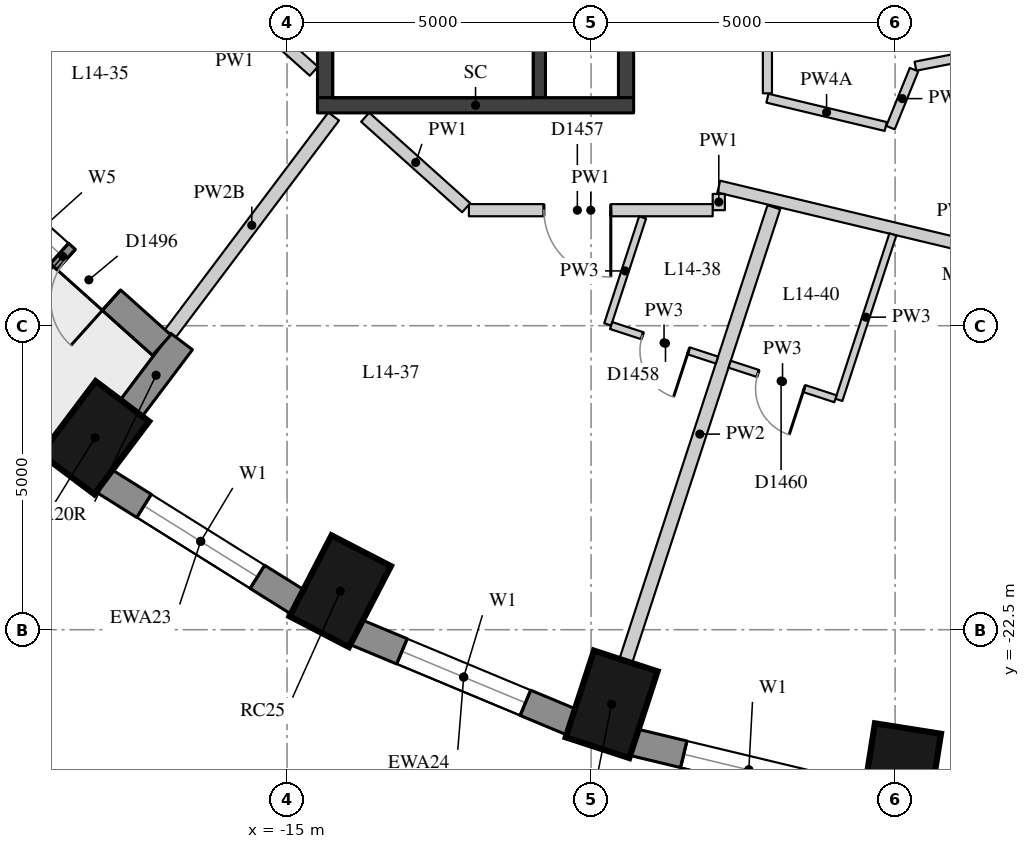
"""IFC4 building model, lengths in metres.
Left out: names, types, materials, properties, quantities, classifications, styles, units other than length and angle.
Written with IfcOpenShell. Run it as: python <this file> out.ifc"""

import sys

from ifc_helpers import new_model, si_unit, direction, frame, frame_2d, origin, origin_2d, place, context, subcontext, project, spatial, rectangle, extrude, element, fill, save


model = new_model("IFC4")
c1 = context("Model", 3, precision=1e-05, world=origin(), true_north=direction((0.0, 1.0)))
c2 = subcontext(c1, "Body", "Model", "MODEL_VIEW")
j1 = project(units=[si_unit("LENGTHUNIT", "METRE"), si_unit("PLANEANGLEUNIT", "RADIAN")], contexts=[c1])
p1 = place(None, origin())
s1 = spatial("IfcSite", under=j1, at=p1, CompositionType="ELEMENT")
p2 = place(p1, origin())
s2 = spatial("IfcBuilding", under=s1, at=p2, CompositionType="ELEMENT")
p3 = place(p2, frame((0.0, 0.0, 54.7)))
s3 = spatial("IfcBuildingStorey", under=s2, at=p3, CompositionType="ELEMENT", Elevation=54.7)
for number, where, z_axis, x_axis in (
    (1, (-18.159, -19.343, 0.0), (0.0, 0.0, 1.0), (-0.601, -0.799, 0.0)),
    (2, (-14.125, -21.867, 0.0), (0.0, 0.0, 1.0), (-0.46, -0.888, 0.0)),
    (3, (-9.662, -23.727, 0.0), (0.0, 0.0, 1.0), (-0.31, -0.951, 0.0)),
    (4, (-4.906, -24.866, 0.0), (0.0, 0.0, 1.0), (-0.156, -0.988, 0.0)),
):
    element("IfcColumn", number, at=place(p3, frame(where, z_axis=z_axis, x_axis=x_axis)), inside=s3, PredefinedType="COLUMN", context=c2, shape_type="SweptSolid", body=[
        extrude(rectangle(XDim=1.5, YDim=1.1, at=origin_2d()), origin(), (0.0, 0.0, 1.0), 3.3),
    ])
p4 = place(p3, frame((-18.023, -20.044, 0.0), z_axis=(0.0, 0.0, 1.0), x_axis=(0.847635480093, -0.530579016629, 0.0)))
e5 = element("IfcWall", 5, at=p4, inside=s3, PredefinedType="SOLIDWALL", context=c2, shape_type="SweptSolid", body=[
    extrude(rectangle(XDim=3.782, YDim=0.45, at=frame_2d((1.891, 0.0))), origin(), (0.0, 0.0, 1.0), 3.02),
])
p5 = place(p4, frame((0.791, 0.0, 0.4)))
e6 = element("IfcOpeningElement", 6, at=p5, cuts=e5, PredefinedType="OPENING", context=c2, shape_type="SweptSolid", body=[
    extrude(rectangle(XDim=2.2, YDim=1.75, at=frame_2d((1.1, 0.875))), frame((0.0, 0.235, 0.0), z_axis=(0.0, -1.0, 0.0), x_axis=(1.0, 0.0, 0.0)), (0.0, 0.0, 1.0), 0.47),
])
p6 = place(p3, frame((-13.875, -22.537, 0.0), z_axis=(0.0, 0.0, 1.0), x_axis=(0.923031964282, -0.384723267966, 0.0)))
e7 = element("IfcWall", 7, at=p6, inside=s3, PredefinedType="SOLIDWALL", context=c2, shape_type="SweptSolid", body=[
    extrude(rectangle(XDim=3.856, YDim=0.45, at=frame_2d((1.928, 0.0))), origin(), (0.0, 0.0, 1.0), 3.02),
])
p7 = place(p6, frame((0.828, 0.0, 0.4)))
e8 = element("IfcOpeningElement", 8, at=p7, cuts=e7, PredefinedType="OPENING", context=c2, shape_type="SweptSolid", body=[
    extrude(rectangle(XDim=2.2, YDim=1.75, at=frame_2d((1.1, 0.875))), frame((0.0, 0.235, 0.0), z_axis=(0.0, -1.0, 0.0), x_axis=(1.0, 0.0, 0.0)), (0.0, 0.0, 1.0), 0.47),
])
p8 = place(p3, frame((-9.308, -24.35, 0.0), z_axis=(0.0, 0.0, 1.0), x_axis=(0.972496561493, -0.232917233979, 0.0)))
e9 = element("IfcWall", 9, at=p8, inside=s3, PredefinedType="SOLIDWALL", context=c2, shape_type="SweptSolid", body=[
    extrude(rectangle(XDim=3.911, YDim=0.45, at=frame_2d((1.956, 0.0))), origin(), (0.0, 0.0, 1.0), 3.02),
])
p9 = place(p8, frame((0.855, 0.0, 0.4)))
e10 = element("IfcOpeningElement", 10, at=p9, cuts=e9, PredefinedType="OPENING", context=c2, shape_type="SweptSolid", body=[
    extrude(rectangle(XDim=2.2, YDim=1.75, at=frame_2d((1.1, 0.875))), frame((0.0, 0.235, 0.0), z_axis=(0.0, -1.0, 0.0), x_axis=(1.0, 0.0, 0.0)), (0.0, 0.0, 1.0), 0.47),
])
p10 = place(p3, frame((-17.572, -18.871, 0.0), z_axis=(0.0, 0.0, 1.0), x_axis=(0.601262851241, 0.799051302306, 0.0)))
e11 = element("IfcWall", 11, at=p10, inside=s3, PredefinedType="SOLIDWALL", context=c2, shape_type="SweptSolid", body=[
    extrude(rectangle(XDim=1.391, YDim=0.45, at=frame_2d((0.696, 0.0))), origin(), (0.0, 0.0, 1.0), 2.57),
])
p11 = place(p3, frame((-20.313, -14.905, 0.0), z_axis=(0.0, 0.0, 1.0), x_axis=(0.744616407434, -0.667492626012, 0.0)))
e12 = element("IfcWall", 12, at=p11, inside=s3, PredefinedType="SOLIDWALL", context=c2, shape_type="SweptSolid", body=[
    extrude(rectangle(XDim=4.365, YDim=0.45, at=frame_2d((2.183, 0.0))), origin(), (0.0, 0.0, 1.0), 3.02),
])
p12 = place(p11, frame((1.108, 0.0, 0.4)))
e13 = element("IfcOpeningElement", 13, at=p12, cuts=e12, PredefinedType="OPENING", context=c2, shape_type="SweptSolid", body=[
    extrude(rectangle(XDim=1.0, YDim=1.75, at=frame_2d((0.5, 0.875))), frame((0.0, 0.235, 0.0), z_axis=(0.0, -1.0, 0.0), x_axis=(1.0, 0.0, 0.0)), (0.0, 0.0, 1.0), 0.47),
])
p13 = place(p11, frame((2.258, 0.0, 0.0)))
e14 = element("IfcOpeningElement", 14, at=p13, cuts=e12, PredefinedType="OPENING", context=c2, shape_type="SweptSolid", body=[
    extrude(rectangle(XDim=1.0, YDim=2.15, at=frame_2d((0.5, 1.075))), frame((0.0, 0.235, 0.0), z_axis=(0.0, -1.0, 0.0), x_axis=(1.0, 0.0, 0.0)), (0.0, 0.0, 1.0), 0.47),
])
p14 = place(p3, frame((-10.85, -13.75, 0.0), z_axis=(0.0, 0.0, 1.0), x_axis=(0.0, 1.0, 0.0)))
e15 = element("IfcWall", 15, at=p14, inside=s3, PredefinedType="SHEAR", context=c2, shape_type="SweptSolid", body=[
    extrude(rectangle(XDim=6.0, YDim=0.2, at=frame_2d((3.0, 0.0))), origin(), (0.0, 0.0, 1.0), 3.02),
])
p15 = place(p14, frame((4.4, 0.0, 0.0)))
e16 = element("IfcOpeningElement", 16, at=p15, cuts=e15, PredefinedType="OPENING", context=c2, shape_type="SweptSolid", body=[
    extrude(rectangle(XDim=1.5, YDim=2.1, at=frame_2d((0.75, 1.05))), frame((0.0, 0.11, 0.0), z_axis=(0.0, -1.0, 0.0), x_axis=(1.0, 0.0, 0.0)), (0.0, 0.0, 1.0), 0.22),
])
p16 = place(p3, frame((-14.375, -13.75, -0.28), z_axis=(0.0, 0.0, 1.0), x_axis=(0.0, 1.0, 0.0)))
e17 = element("IfcWall", 17, at=p16, inside=s3, PredefinedType="SHEAR", context=c2, shape_type="SweptSolid", body=[
    extrude(rectangle(XDim=6.0, YDim=0.25, at=frame_2d((3.0, 0.0))), origin(), (0.0, 0.0, 1.0), 3.3),
])
p17 = place(p3, frame((-9.425, -13.75, -0.28), z_axis=(0.0, 0.0, 1.0), x_axis=(0.0, 1.0, 0.0)))
e18 = element("IfcWall", 18, at=p17, inside=s3, PredefinedType="SHEAR", context=c2, shape_type="SweptSolid", body=[
    extrude(rectangle(XDim=6.0, YDim=0.25, at=frame_2d((3.0, 0.0))), origin(), (0.0, 0.0, 1.0), 3.3),
])
p18 = place(p17, frame((2.4, 0.0, 0.28)))
e19 = element("IfcOpeningElement", 19, at=p18, cuts=e18, PredefinedType="OPENING", context=c2, shape_type="SweptSolid", body=[
    extrude(rectangle(XDim=1.5, YDim=2.1, at=frame_2d((0.75, 1.05))), frame((0.0, 0.135, 0.0), z_axis=(0.0, -1.0, 0.0), x_axis=(1.0, 0.0, 0.0)), (0.0, 0.0, 1.0), 0.27),
])
p19 = place(p3, frame((-14.5, -13.875, -0.28), z_axis=(0.0, 0.0, 1.0), x_axis=(1.0, 0.0, 0.0)))
e20 = element("IfcWall", 20, at=p19, inside=s3, PredefinedType="SHEAR", context=c2, shape_type="SweptSolid", body=[
    extrude(rectangle(XDim=5.2, YDim=0.25, at=frame_2d((2.6, 0.0))), origin(), (0.0, 0.0, 1.0), 3.3),
])
p20 = place(p3, frame((-14.559, -13.314, 0.0), z_axis=(0.0, 0.0, 1.0), x_axis=(-0.744636171002, 0.667470578254, 0.0)))
e21 = element("IfcWall", 21, at=p20, inside=s3, PredefinedType="PARTITIONING", context=c2, shape_type="SweptSolid", body=[
    extrude(rectangle(XDim=2.069, YDim=0.2, at=frame_2d((1.035, 0.0))), origin(), (0.0, 0.0, 1.0), 3.02),
])
p21 = place(p3, frame((-0.098, -17.077, 0.0), z_axis=(0.0, 0.0, 1.0), x_axis=(-0.972607318404, 0.232454305588, 0.0)))
e22 = element("IfcWall", 22, at=p21, inside=s3, PredefinedType="PARTITIONING", context=c2, shape_type="SweptSolid", body=[
    extrude(rectangle(XDim=8.022, YDim=0.2, at=frame_2d((4.011, 0.0))), origin(), (0.0, 0.0, 1.0), 3.02),
])
p22 = place(p21, frame((1.479, 0.0, 0.0)))
e23 = element("IfcOpeningElement", 23, at=p22, cuts=e22, PredefinedType="OPENING", context=c2, shape_type="SweptSolid", body=[
    extrude(rectangle(XDim=1.1, YDim=2.1, at=frame_2d((0.55, 1.05))), frame((0.0, 0.11, 0.0), z_axis=(0.0, -1.0, 0.0), x_axis=(1.0, 0.0, 0.0)), (0.0, 0.0, 1.0), 0.22),
])
p23 = place(p3, frame((-7.9, -15.332, 0.0), z_axis=(0.0, 0.0, 1.0), x_axis=(0.0, -1.0, 0.0)))
e24 = element("IfcWall", 24, at=p23, inside=s3, PredefinedType="PARTITIONING", context=c2, shape_type="SweptSolid", body=[
    extrude(rectangle(XDim=0.268, YDim=0.2, at=frame_2d((0.134, 0.0))), origin(), (0.0, 0.0, 1.0), 3.02),
])
p24 = place(p3, frame((-8.0, -15.6, 0.0), z_axis=(0.0, 0.0, 1.0), x_axis=(-1.0, 0.0, 0.0)))
e25 = element("IfcWall", 25, at=p24, inside=s3, PredefinedType="PARTITIONING", context=c2, shape_type="SweptSolid", body=[
    extrude(rectangle(XDim=4.009, YDim=0.2, at=frame_2d((2.005, 0.0))), origin(), (0.0, 0.0, 1.0), 3.02),
])
p25 = place(p24, frame((1.676, 0.0, 0.0)))
e26 = element("IfcOpeningElement", 26, at=p25, cuts=e25, PredefinedType="OPENING", context=c2, shape_type="SweptSolid", body=[
    extrude(rectangle(XDim=1.1, YDim=2.1, at=frame_2d((0.55, 1.05))), frame((0.0, 0.11, 0.0), z_axis=(0.0, -1.0, 0.0), x_axis=(1.0, 0.0, 0.0)), (0.0, 0.0, 1.0), 0.22),
])
p26 = place(p3, frame((-12.054, -15.56, 0.0), z_axis=(0.0, 0.0, 1.0), x_axis=(-0.744625700487, 0.66748225907, 0.0)))
e27 = element("IfcWall", 27, at=p26, inside=s3, PredefinedType="PARTITIONING", context=c2, shape_type="SweptSolid", body=[
    extrude(rectangle(XDim=2.231, YDim=0.2, at=frame_2d((1.116, 0.0))), origin(), (0.0, 0.0, 1.0), 3.02),
])
p27 = place(p3, frame((-2.615, -12.83, 0.0), z_axis=(0.0, 0.0, 1.0), x_axis=(-0.981297312652, -0.192498270593, 0.0)))
e28 = element("IfcWall", 28, at=p27, inside=s3, PredefinedType="PARTITIONING", context=c2, shape_type="SweptSolid", body=[
    extrude(rectangle(XDim=2.09, YDim=0.15, at=frame_2d((1.045, 0.0))), origin(), (0.0, 0.0, 1.0), 3.02),
])
p28 = place(p3, frame((-4.688, -13.288, 0.0), z_axis=(0.0, 0.0, 1.0), x_axis=(-0.375963709287, -0.926634388148, 0.0)))
e29 = element("IfcWall", 29, at=p28, inside=s3, PredefinedType="PARTITIONING", context=c2, shape_type="SweptSolid", body=[
    extrude(rectangle(XDim=1.03, YDim=0.15, at=frame_2d((0.515, 0.0))), origin(), (0.0, 0.0, 1.0), 3.02),
])
p29 = place(p3, frame((-5.154, -14.224, 0.0), z_axis=(0.0, 0.0, 1.0), x_axis=(-0.97258848944, 0.232533073366, 0.0)))
e30 = element("IfcWall", 30, at=p29, inside=s3, PredefinedType="PARTITIONING", context=c2, shape_type="SweptSolid", body=[
    extrude(rectangle(XDim=2.001, YDim=0.15, at=frame_2d((1.0, 0.0))), origin(), (0.0, 0.0, 1.0), 2.57),
])
p30 = place(p3, frame((-7.1, -13.678, 0.0), z_axis=(0.0, 0.0, 1.0), x_axis=(0.0, 1.0, 0.0)))
e31 = element("IfcWall", 31, at=p30, inside=s3, PredefinedType="PARTITIONING", context=c2, shape_type="SweptSolid", body=[
    extrude(rectangle(XDim=1.928, YDim=0.15, at=frame_2d((0.964, 0.0))), origin(), (0.0, 0.0, 1.0), 3.02),
])
p31 = place(p3, frame((-16.927, -17.638, 0.0), z_axis=(0.0, 0.0, 1.0), x_axis=(0.601158965663, 0.799129462605, 0.0)))
e32 = element("IfcWall", 32, at=p31, inside=s3, PredefinedType="PARTITIONING", context=c2, shape_type="SweptSolid", body=[
    extrude(rectangle(XDim=4.48, YDim=0.22, at=frame_2d((2.24, 0.0))), origin(), (0.0, 0.0, 1.0), 2.57),
])
p32 = place(p3, frame((-9.429, -23.014, 0.0), z_axis=(0.0, 0.0, 1.0), x_axis=(0.310249775859, 0.950655077607, 0.0)))
e33 = element("IfcWall", 33, at=p32, inside=s3, PredefinedType="PARTITIONING", context=c2, shape_type="SweptSolid", body=[
    extrude(rectangle(XDim=7.85, YDim=0.22, at=frame_2d((3.925, 0.0))), origin(), (0.0, 0.0, 1.0), 3.02),
])
p33 = place(p3, frame((-9.153, -15.719, 0.0), z_axis=(0.0, 0.0, 1.0), x_axis=(-0.310326382186, -0.950630073435, 0.0)))
e34 = element("IfcWall", 34, at=p33, inside=s3, PredefinedType="PARTITIONING", context=c2, shape_type="SweptSolid", body=[
    extrude(rectangle(XDim=1.851, YDim=0.12, at=frame_2d((0.926, 0.0))), origin(), (0.0, 0.0, 1.0), 3.02),
])
p34 = place(p3, frame((-5.037, -15.999, 0.0), z_axis=(0.0, 0.0, 1.0), x_axis=(-0.310181518973, -0.950677350781, 0.0)))
e35 = element("IfcWall", 35, at=p34, inside=s3, PredefinedType="PARTITIONING", context=c2, shape_type="SweptSolid", body=[
    extrude(rectangle(XDim=2.862, YDim=0.12, at=frame_2d((1.431, 0.0))), origin(), (0.0, 0.0, 1.0), 3.02),
])
p35 = place(p3, frame((-9.67, -17.498, 0.0), z_axis=(0.0, 0.0, 1.0), x_axis=(0.950678536911, -0.31017788357, 0.0)))
e36 = element("IfcWall", 36, at=p35, inside=s3, PredefinedType="PARTITIONING", context=c2, shape_type="SweptSolid", body=[
    extrude(rectangle(XDim=1.83, YDim=0.12, at=frame_2d((0.915, 0.0))), origin(), (0.0, 0.0, 1.0), 3.02),
])
p36 = place(p35, frame((0.54, 0.0, 0.0)))
e37 = element("IfcOpeningElement", 37, at=p36, cuts=e36, PredefinedType="OPENING", context=c2, shape_type="SweptSolid", body=[
    extrude(rectangle(XDim=0.8, YDim=2.1, at=frame_2d((0.4, 1.05))), frame((0.0, 0.07, 0.0), z_axis=(0.0, -1.0, 0.0), x_axis=(1.0, 0.0, 0.0)), (0.0, 0.0, 1.0), 0.14),
])
p37 = place(p3, frame((-5.981, -18.701, 0.0), z_axis=(0.0, 0.0, 1.0), x_axis=(-0.950639191072, 0.310298450524, 0.0)))
e38 = element("IfcWall", 38, at=p37, inside=s3, PredefinedType="PARTITIONING", context=c2, shape_type="SweptSolid", body=[
    extrude(rectangle(XDim=1.83, YDim=0.12, at=frame_2d((0.915, 0.0))), origin(), (0.0, 0.0, 1.0), 3.02),
])
p38 = place(p37, frame((0.54, 0.0, 0.0)))
e39 = element("IfcOpeningElement", 39, at=p38, cuts=e38, PredefinedType="OPENING", context=c2, shape_type="SweptSolid", body=[
    extrude(rectangle(XDim=0.8, YDim=2.1, at=frame_2d((0.4, 1.05))), frame((0.0, 0.07, 0.0), z_axis=(0.0, -1.0, 0.0), x_axis=(1.0, 0.0, 0.0)), (0.0, 0.0, 1.0), 0.14),
])
p39 = place(p5, origin())
e40 = element("IfcWindow", 40, at=p39, inside=s3, PartitioningType="SINGLE_PANEL", PredefinedType="WINDOW", context=c2, shape_type="SweptSolid", body=[
    extrude(rectangle(XDim=2.2, YDim=1.75, at=frame_2d((1.1, 0.875))), frame((0.0, 0.035, 0.0), z_axis=(0.0, -1.0, 0.0), x_axis=(1.0, 0.0, 0.0)), (0.0, 0.0, 1.0), 0.06),
])
fill(e6, e40)
p40 = place(p7, origin())
e41 = element("IfcWindow", 41, at=p40, inside=s3, PartitioningType="SINGLE_PANEL", PredefinedType="WINDOW", context=c2, shape_type="SweptSolid", body=[
    extrude(rectangle(XDim=2.2, YDim=1.75, at=frame_2d((1.1, 0.875))), frame((0.0, 0.035, 0.0), z_axis=(0.0, -1.0, 0.0), x_axis=(1.0, 0.0, 0.0)), (0.0, 0.0, 1.0), 0.06),
])
fill(e8, e41)
p41 = place(p9, origin())
e42 = element("IfcWindow", 42, at=p41, inside=s3, PartitioningType="SINGLE_PANEL", PredefinedType="WINDOW", context=c2, shape_type="SweptSolid", body=[
    extrude(rectangle(XDim=2.2, YDim=1.75, at=frame_2d((1.1, 0.875))), frame((0.0, 0.035, 0.0), z_axis=(0.0, -1.0, 0.0), x_axis=(1.0, 0.0, 0.0)), (0.0, 0.0, 1.0), 0.06),
])
fill(e10, e42)
p42 = place(p12, origin())
e43 = element("IfcWindow", 43, at=p42, inside=s3, PartitioningType="SINGLE_PANEL", PredefinedType="WINDOW", context=c2, shape_type="SweptSolid", body=[
    extrude(rectangle(XDim=1.0, YDim=1.75, at=frame_2d((0.5, 0.875))), frame((0.0, 0.035, 0.0), z_axis=(0.0, -1.0, 0.0), x_axis=(1.0, 0.0, 0.0)), (0.0, 0.0, 1.0), 0.06),
])
fill(e13, e43)
p43 = place(p13, frame((1.0, 0.0, 0.0), z_axis=(0.0, 0.0, 1.0), x_axis=(-1.0, 0.0, 0.0)))
e44 = element("IfcDoor", 44, at=p43, inside=s3, OperationType="SINGLE_SWING_LEFT", PredefinedType="DOOR", context=c2, shape_type="SweptSolid", body=[
    extrude(rectangle(XDim=1.0, YDim=2.15, at=frame_2d((0.5, 1.075))), frame((0.0, 0.075, 0.0), z_axis=(0.0, -1.0, 0.0), x_axis=(1.0, 0.0, 0.0)), (0.0, 0.0, 1.0), 0.05),
])
fill(e14, e44)
p44 = place(p25, origin())
e45 = element("IfcDoor", 45, at=p44, inside=s3, OperationType="SINGLE_SWING_LEFT", PredefinedType="DOOR", context=c2, shape_type="SweptSolid", body=[
    extrude(rectangle(XDim=1.1, YDim=2.1, at=frame_2d((0.55, 1.05))), frame((0.0, 0.025, 0.0), z_axis=(0.0, -1.0, 0.0), x_axis=(1.0, 0.0, 0.0)), (0.0, 0.0, 1.0), 0.05),
])
fill(e26, e45)
p45 = place(p36, origin())
e46 = element("IfcDoor", 46, at=p45, inside=s3, OperationType="SINGLE_SWING_LEFT", PredefinedType="DOOR", context=c2, shape_type="SweptSolid", body=[
    extrude(rectangle(XDim=0.8, YDim=2.1, at=frame_2d((0.4, 1.05))), frame((0.0, 0.025, 0.0), z_axis=(0.0, -1.0, 0.0), x_axis=(1.0, 0.0, 0.0)), (0.0, 0.0, 1.0), 0.05),
])
fill(e37, e46)
p46 = place(p38, origin())
e47 = element("IfcDoor", 47, at=p46, inside=s3, OperationType="SINGLE_SWING_LEFT", PredefinedType="DOOR", context=c2, shape_type="SweptSolid", body=[
    extrude(rectangle(XDim=0.8, YDim=2.1, at=frame_2d((0.4, 1.05))), frame((0.0, 0.025, 0.0), z_axis=(0.0, -1.0, 0.0), x_axis=(1.0, 0.0, 0.0)), (0.0, 0.0, 1.0), 0.05),
])
fill(e39, e47)
save(model, sys.argv[1])
